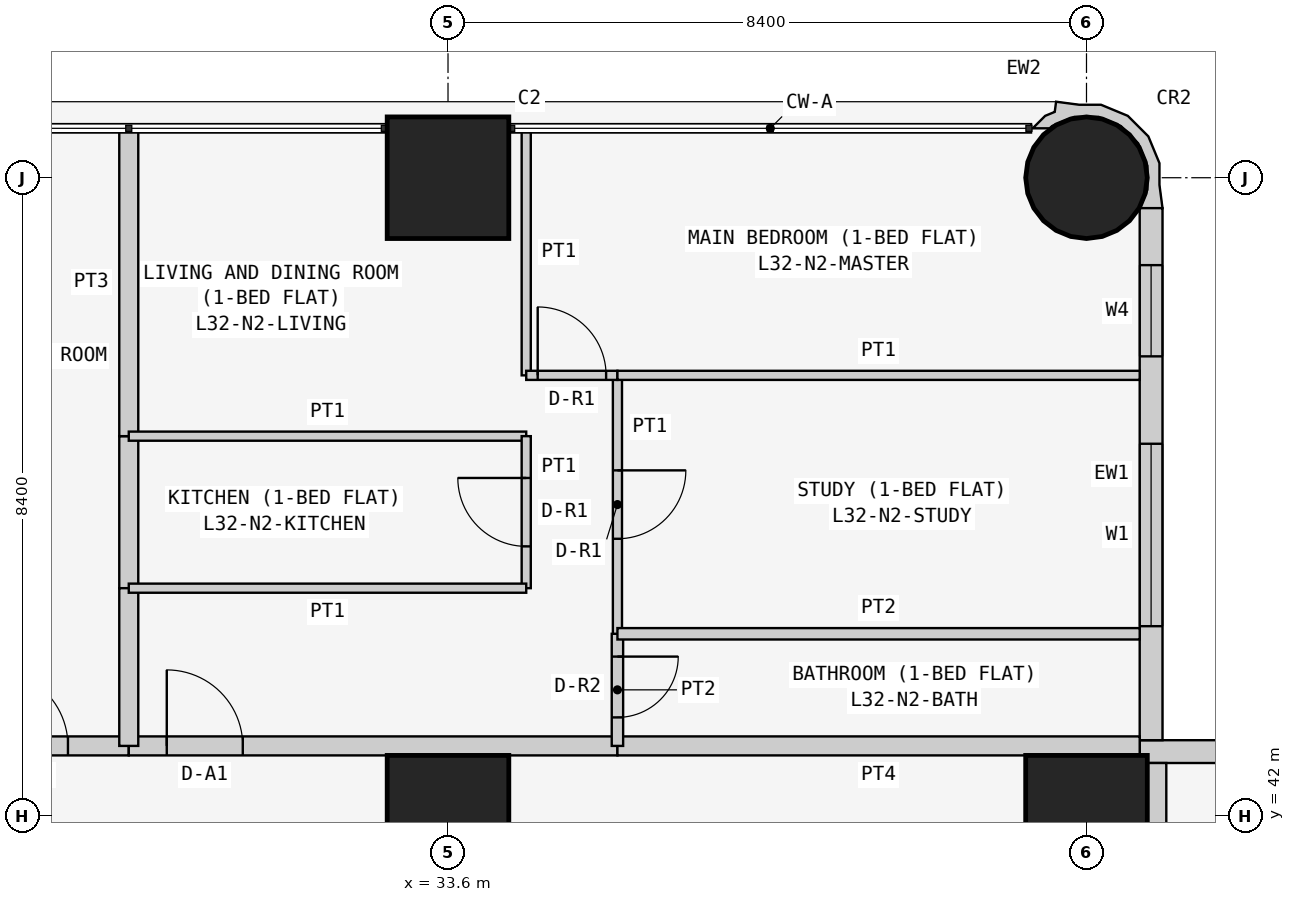
"""IFC4 building model, lengths in metres.
Left out: names, types, materials, properties, quantities, classifications, styles, units other than length and angle.
Written with IfcOpenShell. Run it as: python <this file> out.ifc"""

import sys

from ifc_helpers import new_model, si_unit, direction, frame, frame_2d, origin, origin_2d, place, context, subcontext, project, spatial, polyline, rectangle, circle, outline, extrude, element, fill, save


model = new_model("IFC4")
c1 = context("Model", 3, precision=1e-05, world=origin(), true_north=direction((0.0, 1.0)))
c2 = subcontext(c1, "Body", "Model", "MODEL_VIEW")
j1 = project(units=[si_unit("LENGTHUNIT", "METRE"), si_unit("PLANEANGLEUNIT", "RADIAN")], contexts=[c1])
p1 = place(None, origin())
s1 = spatial("IfcSite", under=j1, at=p1, CompositionType="ELEMENT")
p2 = place(p1, origin())
s2 = spatial("IfcBuilding", under=s1, at=p2, CompositionType="ELEMENT")
p3 = place(p2, frame((0.0, 0.0, 126.9)))
s3 = spatial("IfcBuildingStorey", under=s2, at=p3, CompositionType="ELEMENT", Elevation=126.9)
for number, where, z_axis, x_axis in (
    (1, (33.6, 42.0, 0.0), (0.0, 0.0, 1.0), (1.0, 0.0, 0.0)),
    (2, (33.6, 50.4, 0.0), (0.0, 0.0, 1.0), (1.0, 0.0, 0.0)),
    (3, (42.0, 42.0, 0.0), (0.0, 0.0, 1.0), (1.0, 0.0, 0.0)),
):
    element("IfcColumn", number, at=place(p3, frame(where, z_axis=z_axis, x_axis=x_axis)), inside=s3, PredefinedType="COLUMN", context=c2, shape_type="SweptSolid", body=[
        extrude(rectangle(XDim=1.6, YDim=1.6, at=origin_2d()), origin(), (0.0, 0.0, 1.0), 3.6),
    ])
p4 = place(p3, frame((42.0, 50.4, 0.0), z_axis=(0.0, 0.0, 1.0), x_axis=(1.0, 0.0, 0.0)))
e4 = element("IfcColumn", 4, at=p4, inside=s3, PredefinedType="COLUMN", context=c2, shape_type="SweptSolid", body=[
    extrude(circle(Radius=0.8, at=origin_2d()), origin(), (0.0, 0.0, 1.0), 3.6),
])
p5 = place(p3, frame((58.4, 42.85, 0.0), z_axis=(0.0, 0.0, 1.0), x_axis=(-1.0, 0.0, 0.0)))
e5 = element("IfcWall", 5, at=p5, inside=s3, PredefinedType="SOLIDWALL", context=c2, shape_type="SweptSolid", body=[
    extrude(rectangle(XDim=15.7, YDim=0.3, at=frame_2d((7.85, 0.0))), origin(), (0.0, 0.0, 1.0), 3.45),
])
p6 = place(p5, frame((12.4, 0.0, 0.9)))
e6 = element("IfcOpeningElement", 6, at=p6, cuts=e5, PredefinedType="OPENING", context=c2, shape_type="SweptSolid", body=[
    extrude(rectangle(XDim=1.8, YDim=1.5, at=frame_2d((0.9, 0.75))), frame((0.0, 0.16, 0.0), z_axis=(0.0, -1.0, 0.0), x_axis=(1.0, 0.0, 0.0)), (0.0, 0.0, 1.0), 0.32),
])
p7 = place(p5, frame((9.55, 0.0, 1.5)))
e7 = element("IfcOpeningElement", 7, at=p7, cuts=e5, PredefinedType="OPENING", context=c2, shape_type="SweptSolid", body=[
    extrude(rectangle(XDim=0.9, YDim=0.7, at=frame_2d((0.45, 0.35))), frame((0.0, 0.16, 0.0), z_axis=(0.0, -1.0, 0.0), x_axis=(1.0, 0.0, 0.0)), (0.0, 0.0, 1.0), 0.32),
])
p8 = place(p5, frame((5.1, 0.0, 0.9)))
e8 = element("IfcOpeningElement", 8, at=p8, cuts=e5, PredefinedType="OPENING", context=c2, shape_type="SweptSolid", body=[
    extrude(rectangle(XDim=1.8, YDim=1.5, at=frame_2d((0.9, 0.75))), frame((0.0, 0.16, 0.0), z_axis=(0.0, -1.0, 0.0), x_axis=(1.0, 0.0, 0.0)), (0.0, 0.0, 1.0), 0.32),
])
p9 = place(p5, frame((2.0, 0.0, 0.0)))
e9 = element("IfcOpeningElement", 9, at=p9, cuts=e5, PredefinedType="OPENING", context=c2, shape_type="SweptSolid", body=[
    extrude(rectangle(XDim=0.9, YDim=2.4, at=frame_2d((0.45, 1.2))), frame((0.0, 0.16, 0.0), z_axis=(0.0, -1.0, 0.0), x_axis=(1.0, 0.0, 0.0)), (0.0, 0.0, 1.0), 0.32),
])
p10 = place(p5, frame((0.7, 0.0, 0.9)))
e10 = element("IfcOpeningElement", 10, at=p10, cuts=e5, PredefinedType="OPENING", context=c2, shape_type="SweptSolid", body=[
    extrude(rectangle(XDim=1.2, YDim=1.5, at=frame_2d((0.6, 0.75))), frame((0.0, 0.16, 0.0), z_axis=(0.0, -1.0, 0.0), x_axis=(1.0, 0.0, 0.0)), (0.0, 0.0, 1.0), 0.32),
])
p11 = place(p3, frame((42.85, 43.0, 0.0), z_axis=(0.0, 0.0, 1.0), x_axis=(0.0, 1.0, 0.0)))
e11 = element("IfcWall", 11, at=p11, inside=s3, PredefinedType="SOLIDWALL", context=c2, shape_type="SweptSolid", body=[
    extrude(rectangle(XDim=7.0, YDim=0.3, at=frame_2d((3.5, 0.0))), origin(), (0.0, 0.0, 1.0), 3.45),
])
p12 = place(p11, frame((1.5, 0.0, 0.9)))
e12 = element("IfcOpeningElement", 12, at=p12, cuts=e11, PredefinedType="OPENING", context=c2, shape_type="SweptSolid", body=[
    extrude(rectangle(XDim=2.4, YDim=1.5, at=frame_2d((1.2, 0.75))), frame((0.0, 0.16, 0.0), z_axis=(0.0, -1.0, 0.0), x_axis=(1.0, 0.0, 0.0)), (0.0, 0.0, 1.0), 0.32),
])
p13 = place(p11, frame((5.05, 0.0, 0.9)))
e13 = element("IfcOpeningElement", 13, at=p13, cuts=e11, PredefinedType="OPENING", context=c2, shape_type="SweptSolid", body=[
    extrude(rectangle(XDim=1.2, YDim=1.5, at=frame_2d((0.6, 0.75))), frame((0.0, 0.16, 0.0), z_axis=(0.0, -1.0, 0.0), x_axis=(1.0, 0.0, 0.0)), (0.0, 0.0, 1.0), 0.32),
])
p14 = place(p3, frame((42.817, 50.073, 0.0), z_axis=(0.0, 0.0, 1.0), x_axis=(0.343276641956, 0.93923434088, 0.0)))
e14 = element("IfcWall", 14, at=p14, inside=s3, PredefinedType="SOLIDWALL", context=c2, shape_type="SweptSolid", body=[
    extrude(outline(polyline([(0.266, -0.055), (0.535, 0.044), (0.817, 0.302), (0.978, 0.648), (0.994, 1.03), (0.895, 1.3), (0.828, 1.598), (0.697, 1.569), (0.604, 1.67), (0.394, 1.767), (0.471, 1.556), (0.509, 1.539), (0.724, 1.304), (0.833, 1.005), (0.82, 0.687), (0.686, 0.397), (0.451, 0.182), (0.152, 0.073), (-0.116, 0.084), (-0.128, 0.078), (-0.146, 0.071), (-0.006, -0.197), (0.266, -0.055)])), origin(), (0.0, 0.0, 1.0), 3.45),
])
p15 = place(p3, frame((26.8, 42.925, 0.0), z_axis=(0.0, 0.0, 1.0), x_axis=(1.0, 0.0, 0.0)))
e15 = element("IfcWall", 15, at=p15, inside=s3, PredefinedType="PARTITIONING", context=c2, shape_type="SweptSolid", body=[
    extrude(rectangle(XDim=2.6, YDim=0.25, at=frame_2d((1.3, 0.0))), origin(), (0.0, 0.0, 1.0), 3.45),
])
p16 = place(p15, frame((0.8, 0.0, 0.0)))
e16 = element("IfcOpeningElement", 16, at=p16, cuts=e15, PredefinedType="OPENING", context=c2, shape_type="SweptSolid", body=[
    extrude(rectangle(XDim=1.0, YDim=2.1, at=frame_2d((0.5, 1.05))), frame((0.0, 0.135, 0.0), z_axis=(0.0, -1.0, 0.0), x_axis=(1.0, 0.0, 0.0)), (0.0, 0.0, 1.0), 0.27),
])
p17 = place(p3, frame((29.4, 42.925, 0.0), z_axis=(0.0, 0.0, 1.0), x_axis=(1.0, 0.0, 0.0)))
e17 = element("IfcWall", 17, at=p17, inside=s3, PredefinedType="PARTITIONING", context=c2, shape_type="SweptSolid", body=[
    extrude(rectangle(XDim=6.429, YDim=0.25, at=frame_2d((3.215, 0.0))), origin(), (0.0, 0.0, 1.0), 3.45),
])
p18 = place(p17, frame((0.5, 0.0, 0.0)))
e18 = element("IfcOpeningElement", 18, at=p18, cuts=e17, PredefinedType="OPENING", context=c2, shape_type="SweptSolid", body=[
    extrude(rectangle(XDim=1.0, YDim=2.1, at=frame_2d((0.5, 1.05))), frame((0.0, 0.135, 0.0), z_axis=(0.0, -1.0, 0.0), x_axis=(1.0, 0.0, 0.0)), (0.0, 0.0, 1.0), 0.27),
])
for number, where, z_axis, x_axis in (
    (19, (35.829, 42.925, 0.0), (0.0, 0.0, 1.0), (1.0, 0.0, 0.0)),
    (20, (42.925, 42.7, 0.0), (0.0, 0.0, 1.0), (0.0, -1.0, 0.0)),
):
    element("IfcWall", number, at=place(p3, frame(where, z_axis=z_axis, x_axis=x_axis)), inside=s3, PredefinedType="PARTITIONING", context=c2, shape_type="SweptSolid", body=[
        extrude(rectangle(XDim=6.871, YDim=0.25, at=frame_2d((3.436, 0.0))), origin(), (0.0, 0.0, 1.0), 3.45),
    ])
p19 = place(p3, frame((29.4, 47.0, 0.0), z_axis=(0.0, 0.0, 1.0), x_axis=(0.0, -1.0, 0.0)))
e21 = element("IfcWall", 21, at=p19, inside=s3, PredefinedType="PARTITIONING", context=c2, shape_type="SweptSolid", body=[
    extrude(rectangle(XDim=2.0, YDim=0.25, at=frame_2d((1.0, 0.0))), origin(), (0.0, 0.0, 1.0), 2.848),
])
p20 = place(p3, frame((29.4, 45.0, 0.0), z_axis=(0.0, 0.0, 1.0), x_axis=(0.0, -1.0, 0.0)))
e22 = element("IfcWall", 22, at=p20, inside=s3, PredefinedType="PARTITIONING", context=c2, shape_type="SweptSolid", body=[
    extrude(rectangle(XDim=2.075, YDim=0.25, at=frame_2d((1.038, 0.0))), origin(), (0.0, 0.0, 1.0), 2.848),
])
p21 = place(p3, frame((29.4, 51.05, 0.0), z_axis=(0.0, 0.0, 1.0), x_axis=(0.0, -1.0, 0.0)))
e23 = element("IfcWall", 23, at=p21, inside=s3, PredefinedType="PARTITIONING", context=c2, shape_type="SweptSolid", body=[
    extrude(rectangle(XDim=4.05, YDim=0.25, at=frame_2d((2.025, 0.0))), origin(), (0.0, 0.0, 1.0), 2.848),
])
p22 = place(p3, frame((29.4, 47.0, 0.0), z_axis=(0.0, 0.0, 1.0), x_axis=(1.0, 0.0, 0.0)))
e24 = element("IfcWall", 24, at=p22, inside=s3, PredefinedType="PARTITIONING", context=c2, shape_type="SweptSolid", body=[
    extrude(rectangle(XDim=5.229, YDim=0.12, at=frame_2d((2.615, 0.0))), origin(), (0.0, 0.0, 1.0), 3.45),
])
p23 = place(p3, frame((34.629, 47.0, 0.0), z_axis=(0.0, 0.0, 1.0), x_axis=(0.0, -1.0, 0.0)))
e25 = element("IfcWall", 25, at=p23, inside=s3, PredefinedType="PARTITIONING", context=c2, shape_type="SweptSolid", body=[
    extrude(rectangle(XDim=2.0, YDim=0.12, at=frame_2d((1.0, 0.0))), origin(), (0.0, 0.0, 1.0), 3.45),
])
p24 = place(p23, frame((0.55, 0.0, 0.0)))
e26 = element("IfcOpeningElement", 26, at=p24, cuts=e25, PredefinedType="OPENING", context=c2, shape_type="SweptSolid", body=[
    extrude(rectangle(XDim=0.9, YDim=2.1, at=frame_2d((0.45, 1.05))), frame((0.0, 0.07, 0.0), z_axis=(0.0, -1.0, 0.0), x_axis=(1.0, 0.0, 0.0)), (0.0, 0.0, 1.0), 0.14),
])
p25 = place(p3, frame((34.629, 45.0, 0.0), z_axis=(0.0, 0.0, 1.0), x_axis=(-1.0, 0.0, 0.0)))
e27 = element("IfcWall", 27, at=p25, inside=s3, PredefinedType="PARTITIONING", context=c2, shape_type="SweptSolid", body=[
    extrude(rectangle(XDim=5.229, YDim=0.12, at=frame_2d((2.615, 0.0))), origin(), (0.0, 0.0, 1.0), 3.45),
])
p26 = place(p3, frame((35.829, 44.4, 0.0), z_axis=(0.0, 0.0, 1.0), x_axis=(0.0, -1.0, 0.0)))
e28 = element("IfcWall", 28, at=p26, inside=s3, PredefinedType="PARTITIONING", context=c2, shape_type="SweptSolid", body=[
    extrude(rectangle(XDim=1.475, YDim=0.15, at=frame_2d((0.737, 0.0))), origin(), (0.0, 0.0, 1.0), 3.45),
])
p27 = place(p26, frame((0.3, 0.0, 0.0)))
e29 = element("IfcOpeningElement", 29, at=p27, cuts=e28, PredefinedType="OPENING", context=c2, shape_type="SweptSolid", body=[
    extrude(rectangle(XDim=0.8, YDim=2.1, at=frame_2d((0.4, 1.05))), frame((0.0, 0.085, 0.0), z_axis=(0.0, -1.0, 0.0), x_axis=(1.0, 0.0, 0.0)), (0.0, 0.0, 1.0), 0.17),
])
p28 = place(p3, frame((35.829, 47.8, 0.0), z_axis=(0.0, 0.0, 1.0), x_axis=(0.0, -1.0, 0.0)))
e30 = element("IfcWall", 30, at=p28, inside=s3, PredefinedType="PARTITIONING", context=c2, shape_type="SweptSolid", body=[
    extrude(rectangle(XDim=3.4, YDim=0.12, at=frame_2d((1.7, 0.0))), origin(), (0.0, 0.0, 1.0), 3.45),
])
p29 = place(p28, frame((1.25, 0.0, 0.0)))
e31 = element("IfcOpeningElement", 31, at=p29, cuts=e30, PredefinedType="OPENING", context=c2, shape_type="SweptSolid", body=[
    extrude(rectangle(XDim=0.9, YDim=2.1, at=frame_2d((0.45, 1.05))), frame((0.0, 0.07, 0.0), z_axis=(0.0, -1.0, 0.0), x_axis=(1.0, 0.0, 0.0)), (0.0, 0.0, 1.0), 0.14),
])
p30 = place(p3, frame((34.629, 51.05, 0.0), z_axis=(0.0, 0.0, 1.0), x_axis=(0.0, -1.0, 0.0)))
e32 = element("IfcWall", 32, at=p30, inside=s3, PredefinedType="PARTITIONING", context=c2, shape_type="SweptSolid", body=[
    extrude(rectangle(XDim=3.25, YDim=0.12, at=frame_2d((1.625, 0.0))), origin(), (0.0, 0.0, 1.0), 3.45),
])
p31 = place(p3, frame((34.629, 47.8, 0.0), z_axis=(0.0, 0.0, 1.0), x_axis=(1.0, 0.0, 0.0)))
e33 = element("IfcWall", 33, at=p31, inside=s3, PredefinedType="PARTITIONING", context=c2, shape_type="SweptSolid", body=[
    extrude(rectangle(XDim=1.2, YDim=0.12, at=frame_2d((0.6, 0.0))), origin(), (0.0, 0.0, 1.0), 3.45),
])
p32 = place(p31, frame((0.151, 0.0, 0.0)))
e34 = element("IfcOpeningElement", 34, at=p32, cuts=e33, PredefinedType="OPENING", context=c2, shape_type="SweptSolid", body=[
    extrude(rectangle(XDim=0.9, YDim=2.1, at=frame_2d((0.45, 1.05))), frame((0.0, 0.07, 0.0), z_axis=(0.0, -1.0, 0.0), x_axis=(1.0, 0.0, 0.0)), (0.0, 0.0, 1.0), 0.14),
])
p33 = place(p3, frame((35.829, 44.4, 0.0), z_axis=(0.0, 0.0, 1.0), x_axis=(1.0, 0.0, 0.0)))
e35 = element("IfcWall", 35, at=p33, inside=s3, PredefinedType="PARTITIONING", context=c2, shape_type="SweptSolid", body=[
    extrude(rectangle(XDim=6.871, YDim=0.15, at=frame_2d((3.436, 0.0))), origin(), (0.0, 0.0, 1.0), 3.45),
])
p34 = place(p3, frame((35.829, 47.8, 0.0), z_axis=(0.0, 0.0, 1.0), x_axis=(1.0, 0.0, 0.0)))
e36 = element("IfcWall", 36, at=p34, inside=s3, PredefinedType="PARTITIONING", context=c2, shape_type="SweptSolid", body=[
    extrude(rectangle(XDim=6.871, YDim=0.12, at=frame_2d((3.436, 0.0))), origin(), (0.0, 0.0, 1.0), 3.45),
])
p35 = place(p12, origin())
e37 = element("IfcWindow", 37, at=p35, inside=s3, PartitioningType="SINGLE_PANEL", PredefinedType="WINDOW", context=c2, shape_type="SweptSolid", body=[
    extrude(rectangle(XDim=2.4, YDim=1.5, at=frame_2d((1.2, 0.75))), frame((0.0, 0.03, 0.0), z_axis=(0.0, -1.0, 0.0), x_axis=(1.0, 0.0, 0.0)), (0.0, 0.0, 1.0), 0.06),
])
fill(e12, e37)
p36 = place(p13, origin())
e38 = element("IfcWindow", 38, at=p36, inside=s3, PartitioningType="SINGLE_PANEL", PredefinedType="WINDOW", context=c2, shape_type="SweptSolid", body=[
    extrude(rectangle(XDim=1.2, YDim=1.5, at=frame_2d((0.6, 0.75))), frame((0.0, 0.03, 0.0), z_axis=(0.0, -1.0, 0.0), x_axis=(1.0, 0.0, 0.0)), (0.0, 0.0, 1.0), 0.06),
])
fill(e13, e38)
p37 = place(p16, origin())
e39 = element("IfcDoor", 39, at=p37, inside=s3, OperationType="SINGLE_SWING_LEFT", PredefinedType="DOOR", context=c2, shape_type="SweptSolid", body=[
    extrude(rectangle(XDim=1.0, YDim=2.1, at=frame_2d((0.5, 1.05))), frame((0.0, 0.025, 0.0), z_axis=(0.0, -1.0, 0.0), x_axis=(1.0, 0.0, 0.0)), (0.0, 0.0, 1.0), 0.05),
])
fill(e16, e39)
p38 = place(p18, origin())
e40 = element("IfcDoor", 40, at=p38, inside=s3, OperationType="SINGLE_SWING_LEFT", PredefinedType="DOOR", context=c2, shape_type="SweptSolid", body=[
    extrude(rectangle(XDim=1.0, YDim=2.1, at=frame_2d((0.5, 1.05))), frame((0.0, 0.025, 0.0), z_axis=(0.0, -1.0, 0.0), x_axis=(1.0, 0.0, 0.0)), (0.0, 0.0, 1.0), 0.05),
])
fill(e18, e40)
p39 = place(p24, frame((0.9, 0.0, 0.0), z_axis=(0.0, 0.0, 1.0), x_axis=(-1.0, 0.0, 0.0)))
e41 = element("IfcDoor", 41, at=p39, inside=s3, OperationType="SINGLE_SWING_RIGHT", PredefinedType="DOOR", context=c2, shape_type="SweptSolid", body=[
    extrude(rectangle(XDim=0.9, YDim=2.1, at=frame_2d((0.45, 1.05))), frame((0.0, 0.025, 0.0), z_axis=(0.0, -1.0, 0.0), x_axis=(1.0, 0.0, 0.0)), (0.0, 0.0, 1.0), 0.05),
])
fill(e26, e41)
p40 = place(p27, origin())
e42 = element("IfcDoor", 42, at=p40, inside=s3, OperationType="SINGLE_SWING_LEFT", PredefinedType="DOOR", context=c2, shape_type="SweptSolid", body=[
    extrude(rectangle(XDim=0.8, YDim=2.1, at=frame_2d((0.4, 1.05))), frame((0.0, 0.025, 0.0), z_axis=(0.0, -1.0, 0.0), x_axis=(1.0, 0.0, 0.0)), (0.0, 0.0, 1.0), 0.05),
])
fill(e29, e42)
p41 = place(p29, origin())
e43 = element("IfcDoor", 43, at=p41, inside=s3, OperationType="SINGLE_SWING_LEFT", PredefinedType="DOOR", context=c2, shape_type="SweptSolid", body=[
    extrude(rectangle(XDim=0.9, YDim=2.1, at=frame_2d((0.45, 1.05))), frame((0.0, 0.025, 0.0), z_axis=(0.0, -1.0, 0.0), x_axis=(1.0, 0.0, 0.0)), (0.0, 0.0, 1.0), 0.05),
])
fill(e31, e43)
p42 = place(p32, origin())
e44 = element("IfcDoor", 44, at=p42, inside=s3, OperationType="SINGLE_SWING_LEFT", PredefinedType="DOOR", context=c2, shape_type="SweptSolid", body=[
    extrude(rectangle(XDim=0.9, YDim=2.1, at=frame_2d((0.45, 1.05))), frame((0.0, 0.025, 0.0), z_axis=(0.0, -1.0, 0.0), x_axis=(1.0, 0.0, 0.0)), (0.0, 0.0, 1.0), 0.05),
])
fill(e34, e44)
save(model, sys.argv[1])
